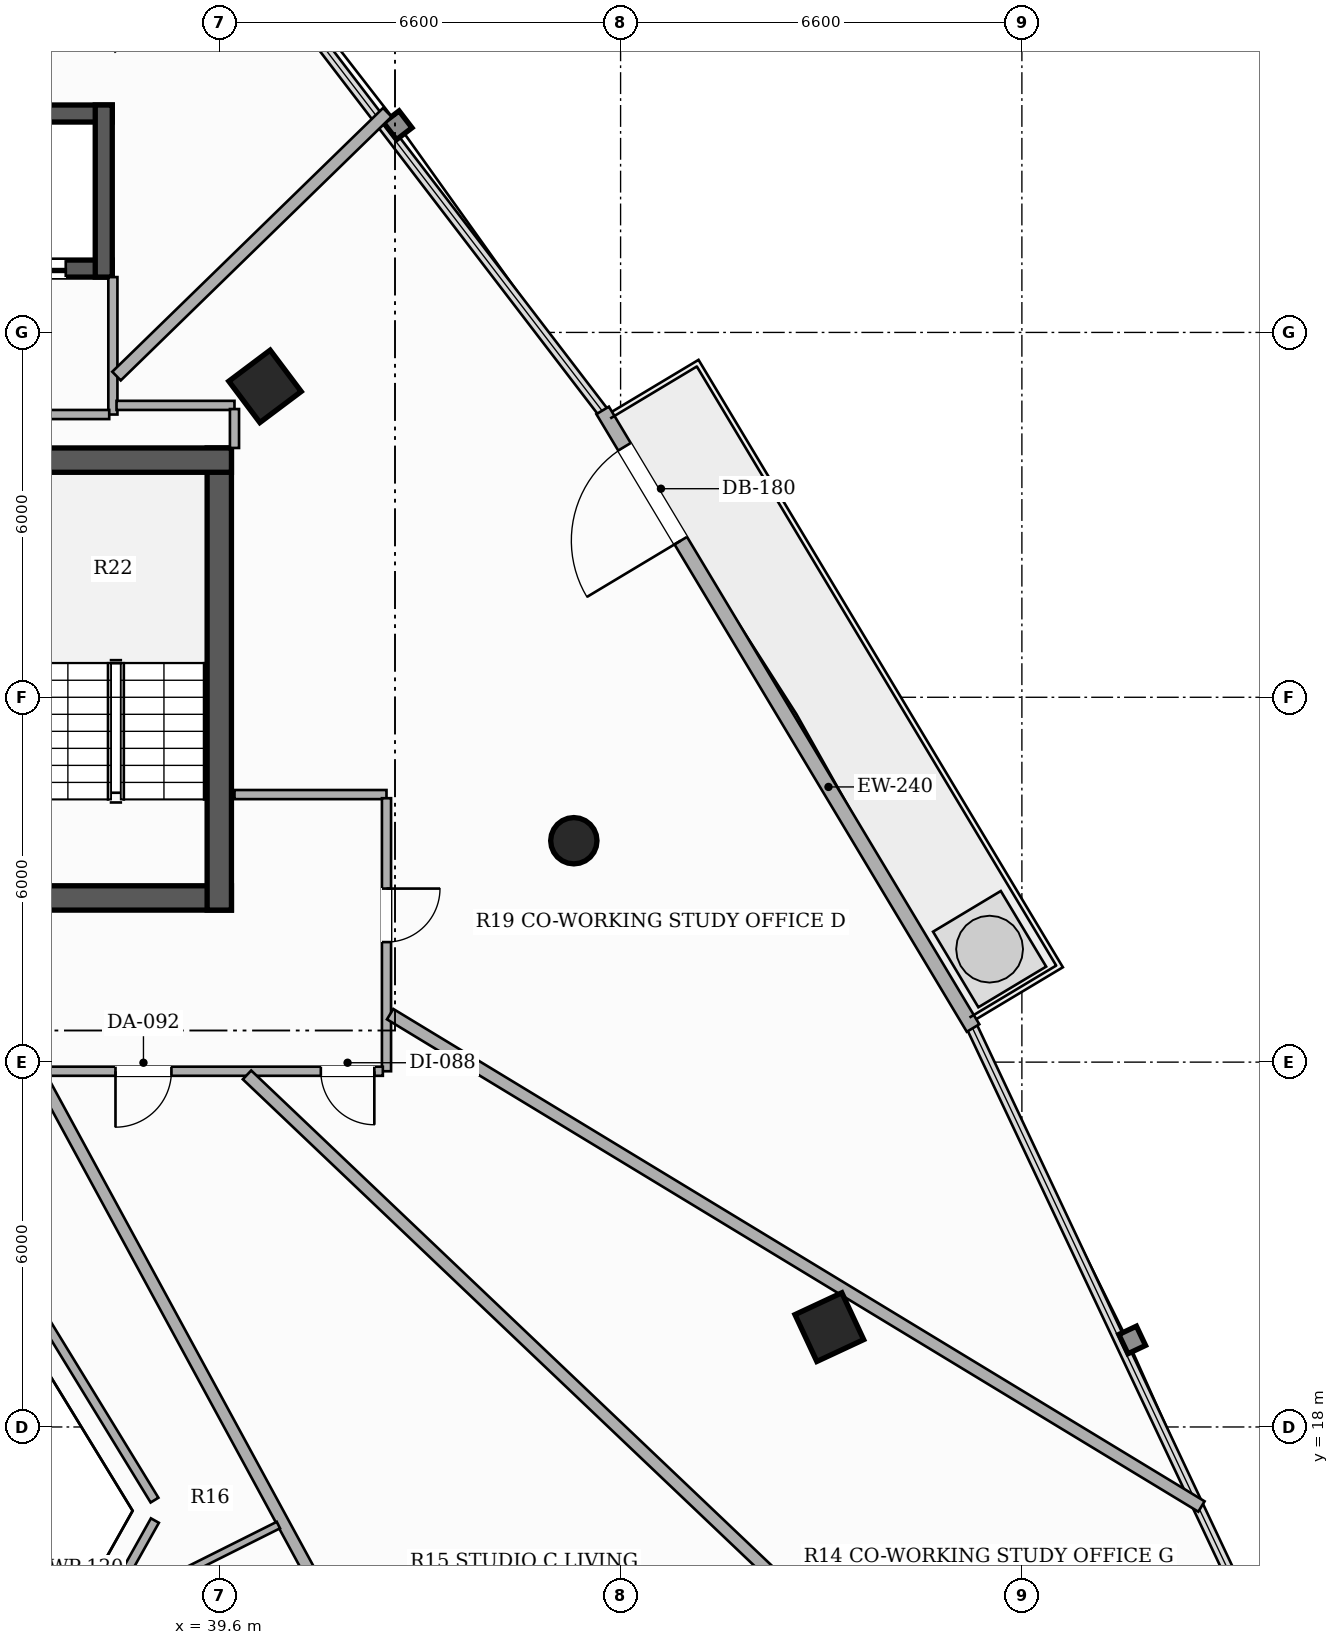
"""IFC4 building model, lengths in metres.
Left out: names, types, materials, properties, quantities, classifications, styles, units other than length and angle.
Written with IfcOpenShell. Run it as: python <this file> out.ifc"""

import sys

from ifc_helpers import new_model, si_unit, direction, frame, frame_2d, origin, origin_2d, place, context, subcontext, project, spatial, rectangle, hollow_rectangle, hollow_circle, extrude, element, fill, save


model = new_model("IFC4")
c1 = context("Model", 3, precision=1e-05, world=origin(), true_north=direction((0.0, 1.0)))
c2 = subcontext(c1, "Body", "Model", "MODEL_VIEW")
j1 = project(units=[si_unit("LENGTHUNIT", "METRE"), si_unit("PLANEANGLEUNIT", "RADIAN")], contexts=[c1])
p1 = place(None, origin())
s1 = spatial("IfcSite", under=j1, at=p1, CompositionType="ELEMENT")
p2 = place(p1, origin())
s2 = spatial("IfcBuilding", under=s1, at=p2, CompositionType="ELEMENT")
p3 = place(p2, frame((0.0, 0.0, 110.0)))
s3 = spatial("IfcBuildingStorey", under=s2, at=p3, CompositionType="ELEMENT", Elevation=110.0)
p4 = place(p3, frame((26.2, 26.7, 0.0), z_axis=(0.0, 0.0, 1.0), x_axis=(1.0, 0.0, 0.0)))
e1 = element("IfcWall", 1, at=p4, inside=s3, PredefinedType="SHEAR", context=c2, shape_type="SweptSolid", body=[
    extrude(rectangle(XDim=13.6, YDim=0.4, at=frame_2d((6.8, 0.0))), origin(), (0.0, 0.0, 1.0), 3.3),
])
p5 = place(p4, frame((4.35, 0.0, 0.0)))
e2 = element("IfcOpeningElement", 2, at=p5, cuts=e1, PredefinedType="OPENING", context=c2, shape_type="SweptSolid", body=[
    extrude(rectangle(XDim=1.05, YDim=2.15, at=frame_2d((0.525, 1.075))), frame((0.0, 0.21, 0.0), z_axis=(0.0, -1.0, 0.0), x_axis=(1.0, 0.0, 0.0)), (0.0, 0.0, 1.0), 0.42),
])
p6 = place(p4, frame((8.3, 0.0, 0.0)))
e3 = element("IfcOpeningElement", 3, at=p6, cuts=e1, PredefinedType="OPENING", context=c2, shape_type="SweptSolid", body=[
    extrude(rectangle(XDim=1.05, YDim=2.15, at=frame_2d((0.525, 1.075))), frame((0.0, 0.21, 0.0), z_axis=(0.0, -1.0, 0.0), x_axis=(1.0, 0.0, 0.0)), (0.0, 0.0, 1.0), 0.42),
])
p7 = place(p3, frame((39.6, 26.5, 0.0), z_axis=(0.0, 0.0, 1.0), x_axis=(0.0, 1.0, 0.0)))
e4 = element("IfcWall", 4, at=p7, inside=s3, PredefinedType="SHEAR", context=c2, shape_type="SweptSolid", body=[
    extrude(rectangle(XDim=7.6, YDim=0.4, at=frame_2d((3.8, 0.0))), origin(), (0.0, 0.0, 1.0), 3.3),
])
p8 = place(p3, frame((36.12, 33.9, 0.0), z_axis=(0.0, 0.0, 1.0), x_axis=(1.0, 0.0, 0.0)))
e5 = element("IfcWall", 5, at=p8, inside=s3, PredefinedType="SHEAR", context=c2, shape_type="SweptSolid", body=[
    extrude(rectangle(XDim=3.68, YDim=0.4, at=frame_2d((1.84, 0.0))), origin(), (0.0, 0.0, 1.0), 3.3),
])
p9 = place(p3, frame((37.84, 37.05, 0.0), z_axis=(0.0, 0.0, 1.0), x_axis=(-1.0, 0.0, 0.0)))
e6 = element("IfcWall", 6, at=p9, inside=s3, PredefinedType="SHEAR", context=c2, shape_type="SweptSolid", body=[
    extrude(rectangle(XDim=9.68, YDim=0.28, at=frame_2d((4.84, 0.0))), origin(), (0.0, 0.0, 1.0), 3.3),
])
p10 = place(p9, frame((7.815, 0.0, 0.0)))
e7 = element("IfcOpeningElement", 7, at=p10, cuts=e6, PredefinedType="OPENING", context=c2, shape_type="SweptSolid", body=[
    extrude(rectangle(XDim=1.1, YDim=2.2, at=frame_2d((0.55, 1.1))), frame((0.0, 0.15, 0.0), z_axis=(0.0, -1.0, 0.0), x_axis=(1.0, 0.0, 0.0)), (0.0, 0.0, 1.0), 0.3),
])
p11 = place(p9, frame((0.765, 0.0, 0.0)))
e8 = element("IfcOpeningElement", 8, at=p11, cuts=e6, PredefinedType="OPENING", context=c2, shape_type="SweptSolid", body=[
    extrude(rectangle(XDim=1.1, YDim=2.2, at=frame_2d((0.55, 1.1))), frame((0.0, 0.15, 0.0), z_axis=(0.0, -1.0, 0.0), x_axis=(1.0, 0.0, 0.0)), (0.0, 0.0, 1.0), 0.3),
])
p12 = place(p3, frame((28.16, 39.6, 0.0), z_axis=(0.0, 0.0, 1.0), x_axis=(1.0, 0.0, 0.0)))
e9 = element("IfcWall", 9, at=p12, inside=s3, PredefinedType="SHEAR", context=c2, shape_type="SweptSolid", body=[
    extrude(rectangle(XDim=9.68, YDim=0.28, at=frame_2d((4.84, 0.0))), origin(), (0.0, 0.0, 1.0), 3.3),
])
p13 = place(p3, frame((37.7, 36.91, 0.0), z_axis=(0.0, 0.0, 1.0), x_axis=(0.0, 1.0, 0.0)))
e10 = element("IfcWall", 10, at=p13, inside=s3, PredefinedType="SHEAR", context=c2, shape_type="SweptSolid", body=[
    extrude(rectangle(XDim=2.83, YDim=0.28, at=frame_2d((1.415, 0.0))), origin(), (0.0, 0.0, 1.0), 3.3),
])
p14 = place(p3, frame((49.633, 19.642, 0.0), z_axis=(0.0, 0.0, 1.0), x_axis=(-0.422618261741, 0.906307787037, 0.0)))
e11 = element("IfcColumn", 11, at=p14, inside=s3, PredefinedType="COLUMN", context=c2, shape_type="SweptSolid", body=[
    extrude(hollow_rectangle(XDim=0.85, YDim=0.85, WallThickness=0.028, at=origin_2d()), origin(), (0.0, 0.0, 1.0), 3.3),
])
p15 = place(p3, frame((45.431, 27.641, 0.0), z_axis=(0.0, 0.0, 1.0), x_axis=(1.0, 0.0, 0.0)))
e12 = element("IfcColumn", 12, at=p15, inside=s3, PredefinedType="COLUMN", context=c2, shape_type="SweptSolid", body=[
    extrude(hollow_circle(Radius=0.381, WallThickness=0.022, at=origin_2d()), origin(), (0.0, 0.0, 1.0), 3.3),
])
p16 = place(p3, frame((40.352, 35.113, 0.0), z_axis=(0.0, 0.0, 1.0), x_axis=(-0.600420225326, 0.799684658487, 0.0)))
e13 = element("IfcColumn", 13, at=p16, inside=s3, PredefinedType="COLUMN", context=c2, shape_type="SweptSolid", body=[
    extrude(hollow_rectangle(XDim=0.85, YDim=0.85, WallThickness=0.028, at=origin_2d()), origin(), (0.0, 0.0, 1.0), 3.3),
])
p17 = place(p3, frame((51.997, 24.561, 0.0), z_axis=(0.0, 0.0, 1.0), x_axis=(-0.514362369366, 0.857572943242, 0.0)))
e14 = element("IfcWall", 14, at=p17, inside=s3, PredefinedType="SOLIDWALL", context=c2, shape_type="SweptSolid", body=[
    extrude(rectangle(XDim=11.844, YDim=0.24, at=frame_2d((5.922, 0.0))), origin(), (0.0, 0.0, 1.0), 2.624),
])
p18 = place(p17, frame((9.346, 0.0, 0.0)))
e15 = element("IfcOpeningElement", 15, at=p18, cuts=e14, PredefinedType="OPENING", context=c2, shape_type="SweptSolid", body=[
    extrude(rectangle(XDim=1.8, YDim=2.2, at=frame_2d((0.9, 1.1))), frame((0.0, 0.13, 0.0), z_axis=(0.0, -1.0, 0.0), x_axis=(1.0, 0.0, 0.0)), (0.0, 0.0, 1.0), 0.26),
])
p19 = place(p3, frame((37.85, 34.65, 0.0), z_axis=(0.0, 0.0, 1.0), x_axis=(0.0, 1.0, 0.0)))
e16 = element("IfcWall", 16, at=p19, inside=s3, PredefinedType="PARTITIONING", context=c2, shape_type="SweptSolid", body=[
    extrude(rectangle(XDim=2.26, YDim=0.15, at=frame_2d((1.13, 0.0))), origin(), (0.0, 0.0, 1.0), 3.06),
])
p20 = place(p3, frame((36.385, 34.65, 0.0), z_axis=(0.0, 0.0, 1.0), x_axis=(1.0, 0.0, 0.0)))
e17 = element("IfcWall", 17, at=p20, inside=s3, PredefinedType="PARTITIONING", context=c2, shape_type="SweptSolid", body=[
    extrude(rectangle(XDim=1.405, YDim=0.15, at=frame_2d((0.703, 0.0))), origin(), (0.0, 0.0, 1.0), 2.425),
])
p21 = place(p3, frame((39.85, 28.4, 0.0), z_axis=(0.0, 0.0, 1.0), x_axis=(1.0, 0.0, 0.0)))
e18 = element("IfcWall", 18, at=p21, inside=s3, PredefinedType="PARTITIONING", context=c2, shape_type="SweptSolid", body=[
    extrude(rectangle(XDim=2.5, YDim=0.15, at=frame_2d((1.25, 0.0))), origin(), (0.0, 0.0, 1.0), 2.721),
])
p22 = place(p3, frame((42.35, 28.34, 0.0), z_axis=(0.0, 0.0, 1.0), x_axis=(0.0, -1.0, 0.0)))
e19 = element("IfcWall", 19, at=p22, inside=s3, PredefinedType="PARTITIONING", context=c2, shape_type="SweptSolid", body=[
    extrude(rectangle(XDim=4.49, YDim=0.15, at=frame_2d((2.245, 0.0))), origin(), (0.0, 0.0, 1.0), 2.721),
])
p23 = place(p22, frame((1.486, 0.0, 0.0)))
e20 = element("IfcOpeningElement", 20, at=p23, cuts=e19, PredefinedType="OPENING", context=c2, shape_type="SweptSolid", body=[
    extrude(rectangle(XDim=0.88, YDim=2.1, at=frame_2d((0.44, 1.05))), frame((0.0, 0.085, 0.0), z_axis=(0.0, -1.0, 0.0), x_axis=(1.0, 0.0, 0.0)), (0.0, 0.0, 1.0), 0.17),
])
p24 = place(p3, frame((42.29, 23.85, 0.0), z_axis=(0.0, 0.0, 1.0), x_axis=(-1.0, 0.0, 0.0)))
e21 = element("IfcWall", 21, at=p24, inside=s3, PredefinedType="PARTITIONING", context=c2, shape_type="SweptSolid", body=[
    extrude(rectangle(XDim=8.065, YDim=0.15, at=frame_2d((4.032, 0.0))), origin(), (0.0, 0.0, 1.0), 2.492),
])
p25 = place(p24, frame((3.477, 0.0, 0.0)))
e22 = element("IfcOpeningElement", 22, at=p25, cuts=e21, PredefinedType="OPENING", context=c2, shape_type="SweptSolid", body=[
    extrude(rectangle(XDim=0.92, YDim=2.15, at=frame_2d((0.46, 1.075))), frame((0.0, 0.085, 0.0), z_axis=(0.0, -1.0, 0.0), x_axis=(1.0, 0.0, 0.0)), (0.0, 0.0, 1.0), 0.17),
])
p26 = place(p24, frame((0.14, 0.0, 0.0)))
e23 = element("IfcOpeningElement", 23, at=p26, cuts=e21, PredefinedType="OPENING", context=c2, shape_type="SweptSolid", body=[
    extrude(rectangle(XDim=0.88, YDim=2.1, at=frame_2d((0.44, 1.05))), frame((0.0, 0.085, 0.0), z_axis=(0.0, -1.0, 0.0), x_axis=(1.0, 0.0, 0.0)), (0.0, 0.0, 1.0), 0.17),
])
p27 = place(p3, frame((37.91, 34.8, 0.0), z_axis=(0.0, 0.0, 1.0), x_axis=(1.0, 0.0, 0.0)))
e24 = element("IfcWall", 24, at=p27, inside=s3, PredefinedType="PARTITIONING", context=c2, shape_type="SweptSolid", body=[
    extrude(rectangle(XDim=1.94, YDim=0.15, at=frame_2d((0.97, 0.0))), origin(), (0.0, 0.0, 1.0), 2.721),
])
p28 = place(p3, frame((39.85, 34.74, 0.0), z_axis=(0.0, 0.0, 1.0), x_axis=(0.0, -1.0, 0.0)))
e25 = element("IfcWall", 25, at=p28, inside=s3, PredefinedType="PARTITIONING", context=c2, shape_type="SweptSolid", body=[
    extrude(rectangle(XDim=0.64, YDim=0.15, at=frame_2d((0.32, 0.0))), origin(), (0.0, 0.0, 1.0), 2.721),
])
p29 = place(p3, frame((34.257, 23.79, 0.0), z_axis=(0.0, 0.0, 1.0), x_axis=(0.521839061235, -0.853043957935, 0.0)))
e26 = element("IfcWall", 26, at=p29, inside=s3, PredefinedType="PARTITIONING", context=c2, shape_type="SweptSolid", body=[
    extrude(rectangle(XDim=8.198, YDim=0.15, at=frame_2d((4.099, 0.0))), origin(), (0.0, 0.0, 1.0), 2.721),
])
p30 = place(p3, frame((38.541, 16.461, 0.0), z_axis=(0.0, 0.0, 1.0), x_axis=(-0.488631416095, -0.872490308946, 0.0)))
e27 = element("IfcWall", 27, at=p30, inside=s3, PredefinedType="PARTITIONING", context=c2, shape_type="SweptSolid", body=[
    extrude(rectangle(XDim=1.06, YDim=0.15, at=frame_2d((0.53, 0.0))), origin(), (0.0, 0.0, 1.0), 3.06),
])
p31 = place(p3, frame((36.646, 23.79, 0.0), z_axis=(0.0, 0.0, 1.0), x_axis=(0.477391569207, -0.878690667784, 0.0)))
e28 = element("IfcWall", 28, at=p31, inside=s3, PredefinedType="PARTITIONING", context=c2, shape_type="SweptSolid", body=[
    extrude(rectangle(XDim=22.918, YDim=0.2, at=frame_2d((11.459, 0.0))), origin(), (0.0, 0.0, 1.0), 2.413),
])
p32 = place(p3, frame((40.056, 23.79, 0.0), z_axis=(0.0, 0.0, 1.0), x_axis=(0.724633427165, -0.68913452695, 0.0)))
e29 = element("IfcWall", 29, at=p32, inside=s3, PredefinedType="PARTITIONING", context=c2, shape_type="SweptSolid", body=[
    extrude(rectangle(XDim=25.921, YDim=0.2, at=frame_2d((12.96, 0.0))), origin(), (0.0, 0.0, 1.0), 2.413),
])
p33 = place(p3, frame((37.91, 35.282, 0.0), z_axis=(0.0, 0.0, 1.0), x_axis=(0.716392659664, 0.697697324905, 0.0)))
e30 = element("IfcWall", 30, at=p33, inside=s3, PredefinedType="PARTITIONING", context=c2, shape_type="SweptSolid", body=[
    extrude(rectangle(XDim=6.216, YDim=0.2, at=frame_2d((3.108, 0.0))), origin(), (0.0, 0.0, 1.0), 2.413),
])
p34 = place(p3, frame((55.753, 16.692, 0.0), z_axis=(0.0, 0.0, 1.0), x_axis=(-0.85489976131, 0.518793213248, 0.0)))
e31 = element("IfcWall", 31, at=p34, inside=s3, PredefinedType="PARTITIONING", context=c2, shape_type="SweptSolid", body=[
    extrude(rectangle(XDim=15.608, YDim=0.2, at=frame_2d((7.804, 0.0))), origin(), (0.0, 0.0, 1.0), 2.413),
])
p35 = place(p3, frame((40.572, 16.387, 0.0), z_axis=(0.0, 0.0, 1.0), x_axis=(-0.894178861749, -0.447709909653, 0.0)))
e32 = element("IfcWall", 32, at=p35, inside=s3, PredefinedType="PARTITIONING", context=c2, shape_type="SweptSolid", body=[
    extrude(rectangle(XDim=7.083, YDim=0.12, at=frame_2d((3.541, 0.0))), origin(), (0.0, 0.0, 1.0), 2.721),
])
p36 = place(p18, origin())
e33 = element("IfcDoor", 33, at=p36, inside=s3, OperationType="SINGLE_SWING_LEFT", PredefinedType="DOOR", context=c2, shape_type="SweptSolid", body=[
    extrude(rectangle(XDim=1.8, YDim=2.2, at=frame_2d((0.9, 1.1))), frame((0.0, 0.025, 0.0), z_axis=(0.0, -1.0, 0.0), x_axis=(1.0, 0.0, 0.0)), (0.0, 0.0, 1.0), 0.05),
])
fill(e15, e33)
p37 = place(p11, origin())
e34 = element("IfcDoor", 34, at=p37, inside=s3, OperationType="DOUBLE_DOOR_SLIDING", PredefinedType="DOOR", context=c2, shape_type="SweptSolid", body=[
    extrude(rectangle(XDim=1.1, YDim=2.2, at=frame_2d((0.55, 1.1))), frame((0.0, 0.025, 0.0), z_axis=(0.0, -1.0, 0.0), x_axis=(1.0, 0.0, 0.0)), (0.0, 0.0, 1.0), 0.05),
])
fill(e8, e34)
p38 = place(p25, origin())
e35 = element("IfcDoor", 35, at=p38, inside=s3, OperationType="SINGLE_SWING_RIGHT", PredefinedType="DOOR", context=c2, shape_type="SweptSolid", body=[
    extrude(rectangle(XDim=0.92, YDim=2.15, at=frame_2d((0.46, 1.075))), frame((0.0, 0.025, 0.0), z_axis=(0.0, -1.0, 0.0), x_axis=(1.0, 0.0, 0.0)), (0.0, 0.0, 1.0), 0.05),
])
fill(e22, e35)
p39 = place(p23, origin())
e36 = element("IfcDoor", 36, at=p39, inside=s3, OperationType="SINGLE_SWING_LEFT", PredefinedType="DOOR", context=c2, shape_type="SweptSolid", body=[
    extrude(rectangle(XDim=0.88, YDim=2.1, at=frame_2d((0.44, 1.05))), frame((0.0, 0.025, 0.0), z_axis=(0.0, -1.0, 0.0), x_axis=(1.0, 0.0, 0.0)), (0.0, 0.0, 1.0), 0.05),
])
fill(e20, e36)
p40 = place(p26, origin())
e37 = element("IfcDoor", 37, at=p40, inside=s3, OperationType="SINGLE_SWING_LEFT", PredefinedType="DOOR", context=c2, shape_type="SweptSolid", body=[
    extrude(rectangle(XDim=0.88, YDim=2.1, at=frame_2d((0.44, 1.05))), frame((0.0, 0.025, 0.0), z_axis=(0.0, -1.0, 0.0), x_axis=(1.0, 0.0, 0.0)), (0.0, 0.0, 1.0), 0.05),
])
fill(e23, e37)
save(model, sys.argv[1])
